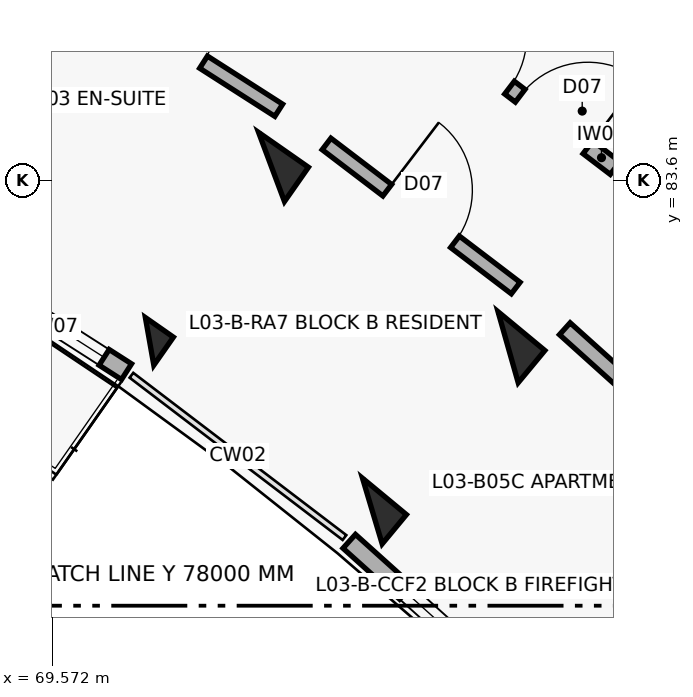
"""IFC4 building model, lengths in metres.
Left out: names, types, materials, properties, quantities, classifications, styles, units other than length and angle.
Written with IfcOpenShell. Run it as: python <this file> out.ifc"""

import sys

from ifc_helpers import new_model, si_unit, direction, frame, frame_2d, origin, origin_2d, place, context, subcontext, project, spatial, rectangle, extrude, element, fill, save


model = new_model("IFC4")
c1 = context("Model", 3, precision=1e-05, world=origin(), true_north=direction((0.0, 1.0)))
c2 = subcontext(c1, "Body", "Model", "MODEL_VIEW")
j1 = project(units=[si_unit("LENGTHUNIT", "METRE"), si_unit("PLANEANGLEUNIT", "RADIAN")], contexts=[c1])
p1 = place(None, origin())
s1 = spatial("IfcSite", under=j1, at=p1, CompositionType="ELEMENT")
p2 = place(p1, origin())
s2 = spatial("IfcBuilding", under=s1, at=p2, CompositionType="ELEMENT")
p3 = place(p2, frame((0.0, 0.0, 11.2)))
s3 = spatial("IfcBuildingStorey", under=s2, at=p3, CompositionType="ELEMENT", Elevation=11.2)
p4 = place(p3, frame((70.854, 81.478, 0.0), z_axis=(0.0, 0.0, 1.0), x_axis=(0.573004420611, 0.819552276527, 0.0)))
e1 = element("IfcColumn", 1, at=p4, inside=s3, PredefinedType="COLUMN", context=c2, shape_type="SweptSolid", body=[
    extrude(rectangle(XDim=0.45, YDim=0.45, at=origin_2d()), origin(), (0.0, 0.0, 1.0), 3.1),
])
p5 = place(p3, frame((72.458, 83.773, 0.0), z_axis=(0.0, 0.0, 1.0), x_axis=(0.573004420611, 0.819552276527, 0.0)))
e2 = element("IfcColumn", 2, at=p5, inside=s3, PredefinedType="COLUMN", context=c2, shape_type="SweptSolid", body=[
    extrude(rectangle(XDim=0.55, YDim=0.8, at=origin_2d()), origin(), (0.0, 0.0, 1.0), 3.1),
])
p6 = place(p3, frame((73.785, 79.245, 0.0), z_axis=(0.0, 0.0, 1.0), x_axis=(0.637961754089, 0.770068049148, 0.0)))
e3 = element("IfcColumn", 3, at=p6, inside=s3, PredefinedType="COLUMN", context=c2, shape_type="SweptSolid", body=[
    extrude(rectangle(XDim=0.5, YDim=0.75, at=origin_2d()), origin(), (0.0, 0.0, 1.0), 3.1),
])
p7 = place(p3, frame((75.571, 81.402, 0.0), z_axis=(0.0, 0.0, 1.0), x_axis=(0.637961754089, 0.770068049148, 0.0)))
e4 = element("IfcColumn", 4, at=p7, inside=s3, PredefinedType="COLUMN", context=c2, shape_type="SweptSolid", body=[
    extrude(rectangle(XDim=0.55, YDim=0.8, at=origin_2d()), origin(), (0.0, 0.0, 1.0), 3.1),
])
p8 = place(p3, frame((67.515, 83.022, 0.0), z_axis=(0.0, 0.0, 1.0), x_axis=(0.84225540507, -0.539078688718, 0.0)))
e5 = element("IfcWall", 5, at=p8, inside=s3, PredefinedType="SOLIDWALL", context=c2, shape_type="SweptSolid", body=[
    extrude(rectangle(XDim=3.604, YDim=0.245, at=frame_2d((1.802, 0.0))), origin(), (0.0, 0.0, 1.0), 2.25),
])
p9 = place(p8, frame((0.4, 0.0, 0.0)))
e6 = element("IfcOpeningElement", 6, at=p9, cuts=e5, PredefinedType="OPENING", context=c2, shape_type="SweptSolid", body=[
    extrude(rectangle(XDim=1.1, YDim=2.15, at=frame_2d((0.55, 1.075))), frame((0.0, 0.133, 0.0), z_axis=(0.0, -1.0, 0.0), x_axis=(1.0, 0.0, 0.0)), (0.0, 0.0, 1.0), 0.265),
])
p10 = place(p8, frame((1.754, 0.0, 0.35)))
e7 = element("IfcOpeningElement", 7, at=p10, cuts=e5, PredefinedType="OPENING", context=c2, shape_type="SweptSolid", body=[
    extrude(rectangle(XDim=1.5, YDim=1.65, at=frame_2d((0.75, 0.825))), frame((0.0, 0.133, 0.0), z_axis=(0.0, -1.0, 0.0), x_axis=(1.0, 0.0, 0.0)), (0.0, 0.0, 1.0), 0.265),
])
p11 = place(p3, frame((73.481, 78.847, 0.0), z_axis=(0.0, 0.0, 1.0), x_axis=(0.743385092197, -0.668863666751, 0.0)))
e8 = element("IfcWall", 8, at=p11, inside=s3, PredefinedType="SOLIDWALL", context=c2, shape_type="SweptSolid", body=[
    extrude(rectangle(XDim=3.604, YDim=0.245, at=frame_2d((1.802, 0.0))), origin(), (0.0, 0.0, 1.0), 2.25),
])
p12 = place(p11, frame((1.002, 0.0, 0.32)))
e9 = element("IfcOpeningElement", 9, at=p12, cuts=e8, PredefinedType="OPENING", context=c2, shape_type="SweptSolid", body=[
    extrude(rectangle(XDim=1.6, YDim=1.5, at=frame_2d((0.8, 0.75))), frame((0.0, 0.133, 0.0), z_axis=(0.0, -1.0, 0.0), x_axis=(1.0, 0.0, 0.0)), (0.0, 0.0, 1.0), 0.265),
])
p13 = place(p3, frame((69.8, 86.281, 0.0), z_axis=(0.0, 0.0, 1.0), x_axis=(0.842225276846, -0.539125758095, 0.0)))
e10 = element("IfcWall", 10, at=p13, inside=s3, PredefinedType="SOLIDWALL", context=c2, shape_type="SweptSolid", body=[
    extrude(rectangle(XDim=3.269, YDim=0.19, at=frame_2d((1.634, 0.0))), origin(), (0.0, 0.0, 1.0), 2.08),
])
p14 = place(p13, frame((1.174, 0.0, 0.0)))
e11 = element("IfcOpeningElement", 11, at=p14, cuts=e10, PredefinedType="OPENING", context=c2, shape_type="SweptSolid", body=[
    extrude(rectangle(XDim=0.92, YDim=2.1, at=frame_2d((0.46, 1.05))), frame((0.0, 0.105, 0.0), z_axis=(0.0, -1.0, 0.0), x_axis=(1.0, 0.0, 0.0)), (0.0, 0.0, 1.0), 0.21),
])
p15 = place(p3, frame((74.357, 85.756, 0.0), z_axis=(0.0, 0.0, 1.0), x_axis=(0.795498026433, -0.605956178235, 0.0)))
e12 = element("IfcWall", 12, at=p15, inside=s3, PredefinedType="SOLIDWALL", context=c2, shape_type="SweptSolid", body=[
    extrude(rectangle(XDim=3.296, YDim=0.21, at=frame_2d((1.648, 0.0))), origin(), (0.0, 0.0, 1.0), 2.08),
])
p16 = place(p15, frame((0.45, 0.0, 0.0)))
e13 = element("IfcOpeningElement", 13, at=p16, cuts=e12, PredefinedType="OPENING", context=c2, shape_type="SweptSolid", body=[
    extrude(rectangle(XDim=1.1, YDim=2.15, at=frame_2d((0.55, 1.075))), frame((0.0, 0.115, 0.0), z_axis=(0.0, -1.0, 0.0), x_axis=(1.0, 0.0, 0.0)), (0.0, 0.0, 1.0), 0.23),
])
p17 = place(p15, frame((1.726, 0.0, 0.0)))
e14 = element("IfcOpeningElement", 14, at=p17, cuts=e12, PredefinedType="OPENING", context=c2, shape_type="SweptSolid", body=[
    extrude(rectangle(XDim=1.12, YDim=2.15, at=frame_2d((0.56, 1.075))), frame((0.0, 0.115, 0.0), z_axis=(0.0, -1.0, 0.0), x_axis=(1.0, 0.0, 0.0)), (0.0, 0.0, 1.0), 0.23),
])
p18 = place(p3, frame((73.182, 84.076, 0.0), z_axis=(0.0, 0.0, 1.0), x_axis=(0.795501577908, -0.605951515838, 0.0)))
e15 = element("IfcWall", 15, at=p18, inside=s3, PredefinedType="SOLIDWALL", context=c2, shape_type="SweptSolid", body=[
    extrude(rectangle(XDim=3.129, YDim=0.19, at=frame_2d((1.564, 0.0))), origin(), (0.0, 0.0, 1.0), 2.08),
])
p19 = place(p18, frame((1.004, 0.0, 0.0)))
e16 = element("IfcOpeningElement", 16, at=p19, cuts=e15, PredefinedType="OPENING", context=c2, shape_type="SweptSolid", body=[
    extrude(rectangle(XDim=1.12, YDim=2.15, at=frame_2d((0.56, 1.075))), frame((0.0, 0.105, 0.0), z_axis=(0.0, -1.0, 0.0), x_axis=(1.0, 0.0, 0.0)), (0.0, 0.0, 1.0), 0.21),
])
p20 = place(p3, frame((76.317, 81.644, 0.0), z_axis=(0.0, 0.0, 1.0), x_axis=(0.743387266925, -0.668861249718, 0.0)))
e17 = element("IfcWall", 17, at=p20, inside=s3, PredefinedType="SOLIDWALL", context=c2, shape_type="SweptSolid", body=[
    extrude(rectangle(XDim=3.128, YDim=0.21, at=frame_2d((1.564, 0.0))), origin(), (0.0, 0.0, 1.0), 2.08),
])
p21 = place(p20, frame((1.014, 0.0, 0.0)))
e18 = element("IfcOpeningElement", 18, at=p21, cuts=e17, PredefinedType="OPENING", context=c2, shape_type="SweptSolid", body=[
    extrude(rectangle(XDim=1.1, YDim=2.15, at=frame_2d((0.55, 1.075))), frame((0.0, 0.115, 0.0), z_axis=(0.0, -1.0, 0.0), x_axis=(1.0, 0.0, 0.0)), (0.0, 0.0, 1.0), 0.23),
])
p22 = place(p10, origin())
e19 = element("IfcWindow", 19, at=p22, inside=s3, PartitioningType="DOUBLE_PANEL_VERTICAL", PredefinedType="WINDOW", context=c2, shape_type="SweptSolid", body=[
    extrude(rectangle(XDim=1.5, YDim=1.65, at=frame_2d((0.75, 0.825))), frame((0.0, 0.03, 0.0), z_axis=(0.0, -1.0, 0.0), x_axis=(1.0, 0.0, 0.0)), (0.0, 0.0, 1.0), 0.06),
])
fill(e7, e19)
p23 = place(p12, origin())
e20 = element("IfcWindow", 20, at=p23, inside=s3, PartitioningType="DOUBLE_PANEL_VERTICAL", PredefinedType="WINDOW", context=c2, shape_type="SweptSolid", body=[
    extrude(rectangle(XDim=1.6, YDim=1.5, at=frame_2d((0.8, 0.75))), frame((0.0, 0.03, 0.0), z_axis=(0.0, -1.0, 0.0), x_axis=(1.0, 0.0, 0.0)), (0.0, 0.0, 1.0), 0.06),
])
fill(e9, e20)
p24 = place(p14, origin())
e21 = element("IfcDoor", 21, at=p24, inside=s3, OperationType="SINGLE_SWING_LEFT", PredefinedType="DOOR", context=c2, shape_type="SweptSolid", body=[
    extrude(rectangle(XDim=0.92, YDim=2.1, at=frame_2d((0.46, 1.05))), frame((0.0, 0.025, 0.0), z_axis=(0.0, -1.0, 0.0), x_axis=(1.0, 0.0, 0.0)), (0.0, 0.0, 1.0), 0.05),
])
fill(e11, e21)
p25 = place(p16, origin())
e22 = element("IfcDoor", 22, at=p25, inside=s3, OperationType="SINGLE_SWING_LEFT", PredefinedType="DOOR", context=c2, shape_type="SweptSolid", body=[
    extrude(rectangle(XDim=1.1, YDim=2.15, at=frame_2d((0.55, 1.075))), frame((0.0, 0.025, 0.0), z_axis=(0.0, -1.0, 0.0), x_axis=(1.0, 0.0, 0.0)), (0.0, 0.0, 1.0), 0.05),
])
fill(e13, e22)
p26 = place(p17, origin())
e23 = element("IfcDoor", 23, at=p26, inside=s3, OperationType="SINGLE_SWING_RIGHT", PredefinedType="DOOR", context=c2, shape_type="SweptSolid", body=[
    extrude(rectangle(XDim=1.12, YDim=2.15, at=frame_2d((0.56, 1.075))), frame((0.0, 0.025, 0.0), z_axis=(0.0, -1.0, 0.0), x_axis=(1.0, 0.0, 0.0)), (0.0, 0.0, 1.0), 0.05),
])
fill(e14, e23)
p27 = place(p19, origin())
e24 = element("IfcDoor", 24, at=p27, inside=s3, OperationType="SINGLE_SWING_LEFT", PredefinedType="DOOR", context=c2, shape_type="SweptSolid", body=[
    extrude(rectangle(XDim=1.12, YDim=2.15, at=frame_2d((0.56, 1.075))), frame((0.0, 0.025, 0.0), z_axis=(0.0, -1.0, 0.0), x_axis=(1.0, 0.0, 0.0)), (0.0, 0.0, 1.0), 0.05),
])
fill(e16, e24)
save(model, sys.argv[1])
